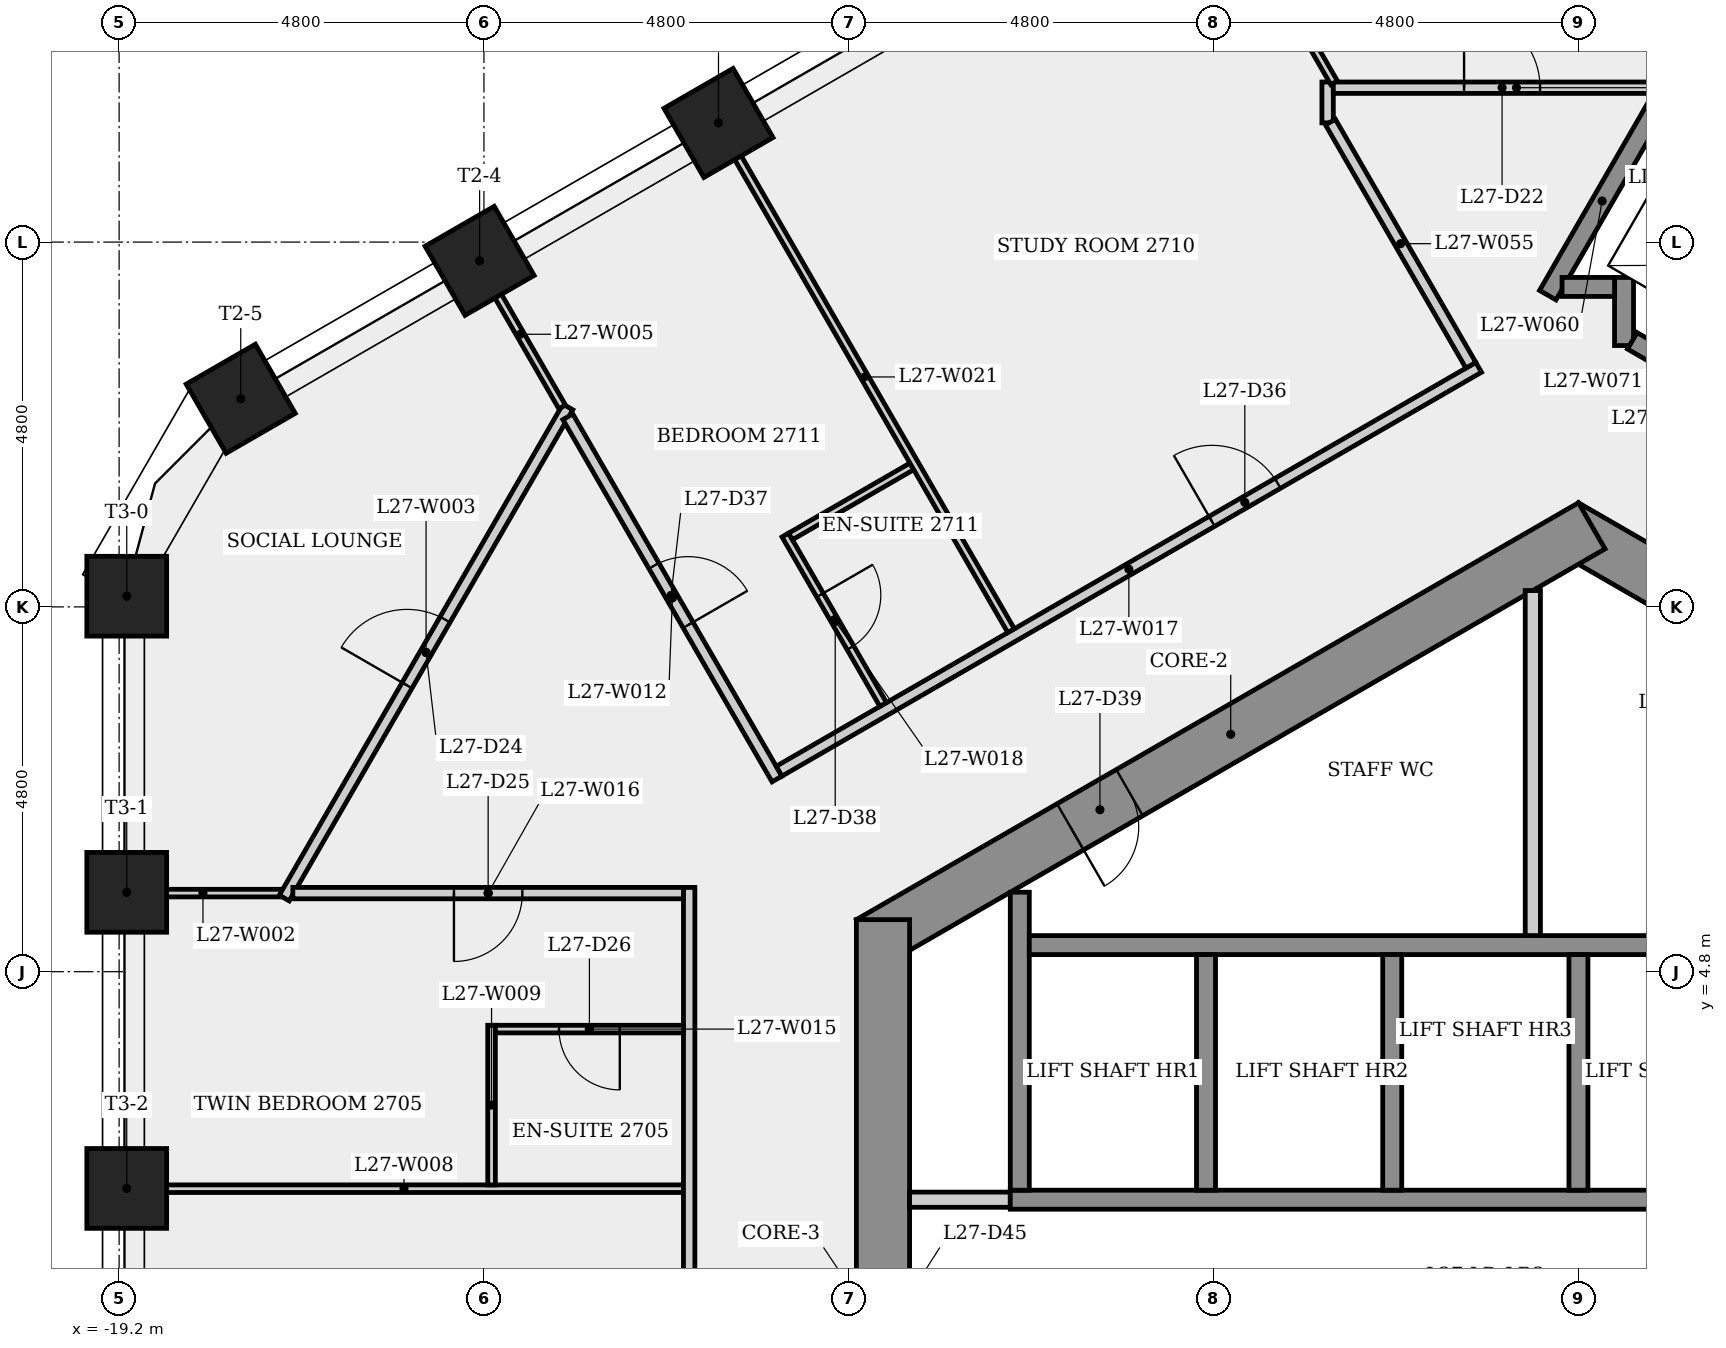
"""IFC4 building model, lengths in metres.
Left out: names, types, materials, properties, quantities, classifications, styles, units other than length and angle.
Written with IfcOpenShell. Run it as: python <this file> out.ifc"""

import sys

from ifc_helpers import new_model, si_unit, direction, frame, frame_2d, origin, origin_2d, place, context, subcontext, project, spatial, rectangle, extrude, element, fill, save


model = new_model("IFC4")
c1 = context("Model", 3, precision=1e-05, world=origin(), true_north=direction((0.0, 1.0)))
c2 = subcontext(c1, "Body", "Model", "MODEL_VIEW")
j1 = project(units=[si_unit("LENGTHUNIT", "METRE"), si_unit("PLANEANGLEUNIT", "RADIAN")], contexts=[c1])
p1 = place(None, origin())
s1 = spatial("IfcSite", under=j1, at=p1, CompositionType="ELEMENT")
p2 = place(p1, origin())
s2 = spatial("IfcBuilding", under=s1, at=p2, CompositionType="ELEMENT")
p3 = place(p2, frame((0.0, 0.0, 103.5)))
s3 = spatial("IfcBuildingStorey", under=s2, at=p3, CompositionType="ELEMENT", Elevation=103.5)
p4 = place(p3, frame((9.325, 5.182, 0.0), z_axis=(0.0, 0.0, 1.0), x_axis=(-0.866023993627, 0.500002442456, 0.0)))
e1 = element("IfcWall", 1, at=p4, inside=s3, PredefinedType="SHEAR", context=c2, shape_type="SweptSolid", body=[
    extrude(rectangle(XDim=10.97, YDim=0.7, at=frame_2d((5.485, 0.0))), origin(), (0.0, 0.0, 1.0), 3.4),
])
p5 = place(p4, frame((5.451, 0.0, 0.0)))
e2 = element("IfcOpeningElement", 2, at=p5, cuts=e1, PredefinedType="OPENING", context=c2, shape_type="SweptSolid", body=[
    extrude(rectangle(XDim=0.9, YDim=2.1, at=frame_2d((0.45, 1.05))), frame((0.0, 0.36, 0.0), z_axis=(0.0, -1.0, 0.0), x_axis=(1.0, 0.0, 0.0)), (0.0, 0.0, 1.0), 0.72),
])
p6 = place(p3, frame((0.175, 10.667, 0.0), z_axis=(0.0, 0.0, 1.0), x_axis=(-0.866023993627, -0.500002442456, 0.0)))
e3 = element("IfcWall", 3, at=p6, inside=s3, PredefinedType="SHEAR", context=c2, shape_type="SweptSolid", body=[
    extrude(rectangle(XDim=10.97, YDim=0.7, at=frame_2d((5.485, 0.0))), origin(), (0.0, 0.0, 1.0), 3.4),
])
p7 = place(p6, frame((7.021, 0.0, 0.0)))
e4 = element("IfcOpeningElement", 4, at=p7, cuts=e3, PredefinedType="OPENING", context=c2, shape_type="SweptSolid", body=[
    extrude(rectangle(XDim=0.9, YDim=2.1, at=frame_2d((0.45, 1.05))), frame((0.0, 0.36, 0.0), z_axis=(0.0, -1.0, 0.0), x_axis=(1.0, 0.0, 0.0)), (0.0, 0.0, 1.0), 0.72),
])
p8 = place(p3, frame((-9.15, 5.485, 0.0), z_axis=(0.0, 0.0, 1.0), x_axis=(0.0, -1.0, 0.0)))
e5 = element("IfcWall", 5, at=p8, inside=s3, PredefinedType="SHEAR", context=c2, shape_type="SweptSolid", body=[
    extrude(rectangle(XDim=10.97, YDim=0.7, at=frame_2d((5.485, 0.0))), origin(), (0.0, 0.0, 1.0), 3.4),
])
p9 = place(p8, frame((4.685, 0.0, 0.0)))
e6 = element("IfcOpeningElement", 6, at=p9, cuts=e5, PredefinedType="OPENING", context=c2, shape_type="SweptSolid", body=[
    extrude(rectangle(XDim=1.6, YDim=2.1, at=frame_2d((0.8, 1.05))), frame((0.0, 0.36, 0.0), z_axis=(0.0, -1.0, 0.0), x_axis=(1.0, 0.0, 0.0)), (0.0, 0.0, 1.0), 0.72),
])
for number, where, z_axis, x_axis in (
    (7, (-11.314, 15.968, 0.0), (0.0, 0.0, 1.0), (-0.5, 0.866, 0.0)),
    (8, (-14.457, 14.153, 0.0), (0.0, 0.0, 1.0), (-0.5, 0.866, 0.0)),
    (9, (-17.6, 12.339, 0.0), (0.0, 0.0, 1.0), (-0.5, 0.866, 0.0)),
    (10, (-19.1, 9.741, 0.0), (0.0, 0.0, 1.0), (-1.0, 0.0, 0.0)),
    (11, (-19.1, 5.844, 0.0), (0.0, 0.0, 1.0), (-1.0, 0.0, 0.0)),
    (12, (-19.1, 1.948, 0.0), (0.0, 0.0, 1.0), (-1.0, 0.0, 0.0)),
):
    element("IfcColumn", number, at=place(p3, frame(where, z_axis=z_axis, x_axis=x_axis)), inside=s3, PredefinedType="COLUMN", context=c2, shape_type="SweptSolid", body=[
        extrude(rectangle(XDim=1.05, YDim=1.05, at=origin_2d()), origin(), (0.0, 0.0, 1.0), 3.4),
    ])
p10 = place(p3, frame((-17.064, 5.834, 0.0), z_axis=(0.0, 0.0, 1.0), x_axis=(-1.0, 0.0, 0.0)))
e13 = element("IfcWall", 13, at=p10, inside=s3, PredefinedType="PARTITIONING", context=c2, shape_type="SweptSolid", body=[
    extrude(rectangle(XDim=2.065, YDim=0.1, at=frame_2d((1.032, 0.0))), origin(), (0.0, 0.0, 1.0), 3.05),
])
p11 = place(p3, frame((-17.027, 5.769, 0.0), z_axis=(0.0, 0.0, 1.0), x_axis=(0.500017007625, 0.866015584205, 0.0)))
e14 = element("IfcWall", 14, at=p11, inside=s3, PredefinedType="PARTITIONING", context=c2, shape_type="SweptSolid", body=[
    extrude(rectangle(XDim=7.462, YDim=0.15, at=frame_2d((3.731, 0.0))), origin(), (0.0, 0.0, 1.0), 3.05),
])
p12 = place(p11, frame((3.231, 0.0, 0.0)))
e15 = element("IfcOpeningElement", 15, at=p12, cuts=e14, PredefinedType="OPENING", context=c2, shape_type="SweptSolid", body=[
    extrude(rectangle(XDim=1.0, YDim=2.1, at=frame_2d((0.5, 1.05))), frame((0.0, 0.085, 0.0), z_axis=(0.0, -1.0, 0.0), x_axis=(1.0, 0.0, 0.0)), (0.0, 0.0, 1.0), 0.17),
])
p13 = place(p3, frame((-14.475, 14.143, 0.0), z_axis=(0.0, 0.0, 1.0), x_axis=(0.49998092645, -0.866036415623, 0.0)))
e16 = element("IfcWall", 16, at=p13, inside=s3, PredefinedType="PARTITIONING", context=c2, shape_type="SweptSolid", body=[
    extrude(rectangle(XDim=2.208, YDim=0.1, at=frame_2d((1.104, 0.0))), origin(), (0.0, 0.0, 1.0), 3.05),
])
p14 = place(p3, frame((-19.129, 1.945, 0.0), z_axis=(0.0, 0.0, 1.0), x_axis=(1.0, 0.0, 0.0)))
e17 = element("IfcWall", 17, at=p14, inside=s3, PredefinedType="PARTITIONING", context=c2, shape_type="SweptSolid", body=[
    extrude(rectangle(XDim=7.354, YDim=0.1, at=frame_2d((3.677, 0.0))), origin(), (0.0, 0.0, 1.0), 3.05),
])
p15 = place(p3, frame((-14.3, 4.095, 0.0), z_axis=(0.0, 0.0, 1.0), x_axis=(0.0, -1.0, 0.0)))
e18 = element("IfcWall", 18, at=p15, inside=s3, PredefinedType="PARTITIONING", context=c2, shape_type="SweptSolid", body=[
    extrude(rectangle(XDim=2.1, YDim=0.1, at=frame_2d((1.05, 0.0))), origin(), (0.0, 0.0, 1.0), 3.05),
])
p16 = place(p3, frame((-13.296, 12.101, 0.0), z_axis=(0.0, 0.0, 1.0), x_axis=(0.499984873778, -0.866034136737, 0.0)))
e19 = element("IfcWall", 19, at=p16, inside=s3, PredefinedType="PARTITIONING", context=c2, shape_type="SweptSolid", body=[
    extrude(rectangle(XDim=5.503, YDim=0.15, at=frame_2d((2.751, 0.0))), origin(), (0.0, 0.0, 1.0), 3.05),
])
p17 = place(p16, frame((2.264, 0.0, 0.0)))
e20 = element("IfcOpeningElement", 20, at=p17, cuts=e19, PredefinedType="OPENING", context=c2, shape_type="SweptSolid", body=[
    extrude(rectangle(XDim=0.9, YDim=2.1, at=frame_2d((0.45, 1.05))), frame((0.0, 0.085, 0.0), z_axis=(0.0, -1.0, 0.0), x_axis=(1.0, 0.0, 0.0)), (0.0, 0.0, 1.0), 0.17),
])
p18 = place(p3, frame((-11.7, 5.909, 0.0), z_axis=(0.0, 0.0, 1.0), x_axis=(0.0, -1.0, 0.0)))
e21 = element("IfcWall", 21, at=p18, inside=s3, PredefinedType="PARTITIONING", context=c2, shape_type="SweptSolid", body=[
    extrude(rectangle(XDim=11.668, YDim=0.15, at=frame_2d((5.834, 0.0))), origin(), (0.0, 0.0, 1.0), 3.05),
])
p19 = place(p18, frame((7.331, 0.0, 0.0)))
e22 = element("IfcOpeningElement", 22, at=p19, cuts=e21, PredefinedType="OPENING", context=c2, shape_type="SweptSolid", body=[
    extrude(rectangle(XDim=1.0, YDim=2.1, at=frame_2d((0.5, 1.05))), frame((0.0, 0.085, 0.0), z_axis=(0.0, -1.0, 0.0), x_axis=(1.0, 0.0, 0.0)), (0.0, 0.0, 1.0), 0.17),
])
p20 = place(p3, frame((-11.775, 4.045, 0.0), z_axis=(0.0, 0.0, 1.0), x_axis=(-1.0, 0.0, 0.0)))
e23 = element("IfcWall", 23, at=p20, inside=s3, PredefinedType="PARTITIONING", context=c2, shape_type="SweptSolid", body=[
    extrude(rectangle(XDim=2.475, YDim=0.1, at=frame_2d((1.238, 0.0))), origin(), (0.0, 0.0, 1.0), 3.05),
])
p21 = place(p20, frame((0.837, 0.0, 0.0)))
e24 = element("IfcOpeningElement", 24, at=p21, cuts=e23, PredefinedType="OPENING", context=c2, shape_type="SweptSolid", body=[
    extrude(rectangle(XDim=0.8, YDim=2.1, at=frame_2d((0.4, 1.05))), frame((0.0, 0.06, 0.0), z_axis=(0.0, -1.0, 0.0), x_axis=(1.0, 0.0, 0.0)), (0.0, 0.0, 1.0), 0.12),
])
p22 = place(p3, frame((-11.775, 5.834, 0.0), z_axis=(0.0, 0.0, 1.0), x_axis=(-1.0, 0.0, 0.0)))
e25 = element("IfcWall", 25, at=p22, inside=s3, PredefinedType="PARTITIONING", context=c2, shape_type="SweptSolid", body=[
    extrude(rectangle(XDim=5.139, YDim=0.15, at=frame_2d((2.57, 0.0))), origin(), (0.0, 0.0, 1.0), 3.05),
])
p23 = place(p22, frame((2.12, 0.0, 0.0)))
e26 = element("IfcOpeningElement", 26, at=p23, cuts=e25, PredefinedType="OPENING", context=c2, shape_type="SweptSolid", body=[
    extrude(rectangle(XDim=0.9, YDim=2.1, at=frame_2d((0.45, 1.05))), frame((0.0, 0.085, 0.0), z_axis=(0.0, -1.0, 0.0), x_axis=(1.0, 0.0, 0.0)), (0.0, 0.0, 1.0), 0.17),
])
p24 = place(p3, frame((-10.517, 7.438, 0.0), z_axis=(0.0, 0.0, 1.0), x_axis=(0.866032192358, 0.499988241661, 0.0)))
e27 = element("IfcWall", 27, at=p24, inside=s3, PredefinedType="PARTITIONING", context=c2, shape_type="SweptSolid", body=[
    extrude(rectangle(XDim=10.628, YDim=0.15, at=frame_2d((5.314, 0.0))), origin(), (0.0, 0.0, 1.0), 3.05),
])
p25 = place(p24, frame((6.575, 0.0, 0.0)))
e28 = element("IfcOpeningElement", 28, at=p25, cuts=e27, PredefinedType="OPENING", context=c2, shape_type="SweptSolid", body=[
    extrude(rectangle(XDim=1.0, YDim=2.1, at=frame_2d((0.5, 1.05))), frame((0.0, 0.085, 0.0), z_axis=(0.0, -1.0, 0.0), x_axis=(1.0, 0.0, 0.0)), (0.0, 0.0, 1.0), 0.17),
])
p26 = place(p3, frame((-10.435, 10.545, 0.0), z_axis=(0.0, 0.0, 1.0), x_axis=(0.500034319456, -0.866005588531, 0.0)))
e29 = element("IfcWall", 29, at=p26, inside=s3, PredefinedType="PARTITIONING", context=c2, shape_type="SweptSolid", body=[
    extrude(rectangle(XDim=2.575, YDim=0.1, at=frame_2d((1.288, 0.0))), origin(), (0.0, 0.0, 1.0), 3.05),
])
p27 = place(p26, frame((0.913, 0.0, 0.0)))
e30 = element("IfcOpeningElement", 30, at=p27, cuts=e29, PredefinedType="OPENING", context=c2, shape_type="SweptSolid", body=[
    extrude(rectangle(XDim=0.8, YDim=2.1, at=frame_2d((0.4, 1.05))), frame((0.0, 0.06, 0.0), z_axis=(0.0, -1.0, 0.0), x_axis=(1.0, 0.0, 0.0)), (0.0, 0.0, 1.0), 0.12),
])
p28 = place(p3, frame((-8.8, 1.8, 0.0), z_axis=(0.0, 0.0, 1.0), x_axis=(1.0, 0.0, 0.0)))
e31 = element("IfcWall", 31, at=p28, inside=s3, PredefinedType="PARTITIONING", context=c2, shape_type="SweptSolid", body=[
    extrude(rectangle(XDim=1.325, YDim=0.2, at=frame_2d((0.663, 0.0))), origin(), (0.0, 0.0, 1.0), 3.05),
])
p29 = place(p3, frame((-8.771, 11.448, 0.0), z_axis=(0.0, 0.0, 1.0), x_axis=(-0.866033360935, -0.499986217557, 0.0)))
e32 = element("IfcWall", 32, at=p29, inside=s3, PredefinedType="PARTITIONING", context=c2, shape_type="SweptSolid", body=[
    extrude(rectangle(XDim=1.843, YDim=0.1, at=frame_2d((0.921, 0.0))), origin(), (0.0, 0.0, 1.0), 3.05),
])
p30 = place(p3, frame((-11.32, 15.964, 0.0), z_axis=(0.0, 0.0, 1.0), x_axis=(0.499997453958, -0.866026873738, 0.0)))
e33 = element("IfcWall", 33, at=p30, inside=s3, PredefinedType="PARTITIONING", context=c2, shape_type="SweptSolid", body=[
    extrude(rectangle(XDim=7.71, YDim=0.1, at=frame_2d((3.855, 0.0))), origin(), (0.0, 0.0, 1.0), 3.05),
])
p31 = place(p3, frame((-7.475, 1.8, 0.0), z_axis=(0.0, 0.0, 1.0), x_axis=(1.0, 0.0, 0.0)))
e34 = element("IfcWall", 34, at=p31, inside=s3, PredefinedType="SHEAR", context=c2, shape_type="SweptSolid", body=[
    extrude(rectangle(XDim=14.95, YDim=0.25, at=frame_2d((7.475, 0.0))), origin(), (0.0, 0.0, 1.0), 3.05),
])
p32 = place(p3, frame((-7.35, 1.925, 0.0), z_axis=(0.0, 0.0, 1.0), x_axis=(0.0, 1.0, 0.0)))
e35 = element("IfcWall", 35, at=p32, inside=s3, PredefinedType="SHEAR", context=c2, shape_type="SweptSolid", body=[
    extrude(rectangle(XDim=3.921, YDim=0.25, at=frame_2d((1.96, 0.0))), origin(), (0.0, 0.0, 1.0), 3.05),
])
p33 = place(p3, frame((-7.225, 5.15, 0.0), z_axis=(0.0, 0.0, 1.0), x_axis=(1.0, 0.0, 0.0)))
e36 = element("IfcWall", 36, at=p33, inside=s3, PredefinedType="SHEAR", context=c2, shape_type="SweptSolid", body=[
    extrude(rectangle(XDim=14.7, YDim=0.25, at=frame_2d((7.35, 0.0))), origin(), (0.0, 0.0, 1.0), 3.05),
])
p34 = place(p3, frame((-4.9, 5.025, 0.0), z_axis=(0.0, 0.0, 1.0), x_axis=(0.0, -1.0, 0.0)))
e37 = element("IfcWall", 37, at=p34, inside=s3, PredefinedType="SHEAR", context=c2, shape_type="SweptSolid", body=[
    extrude(rectangle(XDim=3.1, YDim=0.25, at=frame_2d((1.55, 0.0))), origin(), (0.0, 0.0, 1.0), 3.4),
])
p35 = place(p3, frame((-3.3, 15.969, 0.0), z_axis=(0.0, 0.0, 1.0), x_axis=(0.0, 1.0, 0.0)))
e38 = element("IfcWall", 38, at=p35, inside=s3, PredefinedType="PARTITIONING", context=c2, shape_type="SweptSolid", body=[
    extrude(rectangle(XDim=0.537, YDim=0.15, at=frame_2d((0.269, 0.0))), origin(), (0.0, 0.0, 1.0), 3.05),
])
p36 = place(p3, frame((-3.225, 16.431, 0.0), z_axis=(0.0, 0.0, 1.0), x_axis=(1.0, 0.0, 0.0)))
e39 = element("IfcWall", 39, at=p36, inside=s3, PredefinedType="PARTITIONING", context=c2, shape_type="SweptSolid", body=[
    extrude(rectangle(XDim=4.819, YDim=0.15, at=frame_2d((2.41, 0.0))), origin(), (0.0, 0.0, 1.0), 3.05),
])
p37 = place(p36, frame((1.72, 0.0, 0.0)))
e40 = element("IfcOpeningElement", 40, at=p37, cuts=e39, PredefinedType="OPENING", context=c2, shape_type="SweptSolid", body=[
    extrude(rectangle(XDim=1.0, YDim=2.1, at=frame_2d((0.5, 1.05))), frame((0.0, 0.085, 0.0), z_axis=(0.0, -1.0, 0.0), x_axis=(1.0, 0.0, 0.0)), (0.0, 0.0, 1.0), 0.17),
])
p38 = place(p3, frame((-3.215, 16.496, 0.0), z_axis=(0.0, 0.0, 1.0), x_axis=(-0.499998991654, 0.866025985952, 0.0)))
e41 = element("IfcWall", 41, at=p38, inside=s3, PredefinedType="PARTITIONING", context=c2, shape_type="SweptSolid", body=[
    extrude(rectangle(XDim=3.592, YDim=0.1, at=frame_2d((1.796, 0.0))), origin(), (0.0, 0.0, 1.0), 3.05),
])
p39 = place(p3, frame((-2.45, 5.025, 0.0), z_axis=(0.0, 0.0, 1.0), x_axis=(0.0, -1.0, 0.0)))
e42 = element("IfcWall", 42, at=p39, inside=s3, PredefinedType="SHEAR", context=c2, shape_type="SweptSolid", body=[
    extrude(rectangle(XDim=3.1, YDim=0.25, at=frame_2d((1.55, 0.0))), origin(), (0.0, 0.0, 1.0), 3.4),
])
p40 = place(p3, frame((-1.415, 12.78, 0.0), z_axis=(0.0, 0.0, 1.0), x_axis=(-0.499991312689, 0.866030419348, 0.0)))
e43 = element("IfcWall", 43, at=p40, inside=s3, PredefinedType="PARTITIONING", context=c2, shape_type="SweptSolid", body=[
    extrude(rectangle(XDim=3.694, YDim=0.15, at=frame_2d((1.847, 0.0))), origin(), (0.0, 0.0, 1.0), 3.05),
])
p41 = place(p3, frame((-0.6, 9.815, 0.0), z_axis=(0.0, 0.0, 1.0), x_axis=(0.0, -1.0, 0.0)))
e44 = element("IfcWall", 44, at=p41, inside=s3, PredefinedType="PARTITIONING", context=c2, shape_type="SweptSolid", body=[
    extrude(rectangle(XDim=4.54, YDim=0.2, at=frame_2d((2.27, 0.0))), origin(), (0.0, 0.0, 1.0), 3.05),
])
p42 = place(p3, frame((-0.403, 13.702, 0.0), z_axis=(0.0, 0.0, 1.0), x_axis=(0.499976111731, 0.866039195244, 0.0)))
e45 = element("IfcWall", 45, at=p42, inside=s3, PredefinedType="SHEAR", context=c2, shape_type="SweptSolid", body=[
    extrude(rectangle(XDim=2.861, YDim=0.25, at=frame_2d((1.43, 0.0))), origin(), (0.0, 0.0, 1.0), 3.05),
])
p43 = place(p3, frame((0.0, 5.025, 0.0), z_axis=(0.0, 0.0, 1.0), x_axis=(0.0, -1.0, 0.0)))
e46 = element("IfcWall", 46, at=p43, inside=s3, PredefinedType="SHEAR", context=c2, shape_type="SweptSolid", body=[
    extrude(rectangle(XDim=3.1, YDim=0.25, at=frame_2d((1.55, 0.0))), origin(), (0.0, 0.0, 1.0), 3.4),
])
p44 = place(p3, frame((0.6, 13.039, 0.0), z_axis=(0.0, 0.0, 1.0), x_axis=(0.0, 1.0, 0.0)))
e47 = element("IfcWall", 47, at=p44, inside=s3, PredefinedType="SHEAR", context=c2, shape_type="SweptSolid", body=[
    extrude(rectangle(XDim=0.896, YDim=0.25, at=frame_2d((0.448, 0.0))), origin(), (0.0, 0.0, 1.0), 3.05),
])
p45 = place(p3, frame((0.475, 13.81, 0.0), z_axis=(0.0, 0.0, 1.0), x_axis=(-1.0, 0.0, 0.0)))
e48 = element("IfcWall", 48, at=p45, inside=s3, PredefinedType="SHEAR", context=c2, shape_type="SweptSolid", body=[
    extrude(rectangle(XDim=0.691, YDim=0.25, at=frame_2d((0.345, 0.0))), origin(), (0.0, 0.0, 1.0), 3.4),
])
p46 = place(p3, frame((2.581, 12.02, 0.0), z_axis=(0.0, 0.0, 1.0), x_axis=(-0.86603892542, 0.499976579108, 0.0)))
e49 = element("IfcWall", 49, at=p46, inside=s3, PredefinedType="SHEAR", context=c2, shape_type="SweptSolid", body=[
    extrude(rectangle(XDim=2.162, YDim=0.25, at=frame_2d((1.081, 0.0))), origin(), (0.0, 0.0, 1.0), 3.05),
])
p47 = place(p37, origin())
e50 = element("IfcDoor", 50, at=p47, inside=s3, OperationType="SINGLE_SWING_LEFT", PredefinedType="DOOR", context=c2, shape_type="SweptSolid", body=[
    extrude(rectangle(XDim=1.0, YDim=2.1, at=frame_2d((0.5, 1.05))), frame((0.0, 0.025, 0.0), z_axis=(0.0, -1.0, 0.0), x_axis=(1.0, 0.0, 0.0)), (0.0, 0.0, 1.0), 0.05),
])
fill(e40, e50)
p48 = place(p12, origin())
e51 = element("IfcDoor", 51, at=p48, inside=s3, OperationType="SINGLE_SWING_LEFT", PredefinedType="DOOR", context=c2, shape_type="SweptSolid", body=[
    extrude(rectangle(XDim=1.0, YDim=2.1, at=frame_2d((0.5, 1.05))), frame((0.0, 0.025, 0.0), z_axis=(0.0, -1.0, 0.0), x_axis=(1.0, 0.0, 0.0)), (0.0, 0.0, 1.0), 0.05),
])
fill(e15, e51)
p49 = place(p23, origin())
e52 = element("IfcDoor", 52, at=p49, inside=s3, OperationType="SINGLE_SWING_RIGHT", PredefinedType="DOOR", context=c2, shape_type="SweptSolid", body=[
    extrude(rectangle(XDim=0.9, YDim=2.1, at=frame_2d((0.45, 1.05))), frame((0.0, 0.025, 0.0), z_axis=(0.0, -1.0, 0.0), x_axis=(1.0, 0.0, 0.0)), (0.0, 0.0, 1.0), 0.05),
])
fill(e26, e52)
p50 = place(p21, origin())
e53 = element("IfcDoor", 53, at=p50, inside=s3, OperationType="SINGLE_SWING_LEFT", PredefinedType="DOOR", context=c2, shape_type="SweptSolid", body=[
    extrude(rectangle(XDim=0.8, YDim=2.1, at=frame_2d((0.4, 1.05))), frame((0.0, 0.025, 0.0), z_axis=(0.0, -1.0, 0.0), x_axis=(1.0, 0.0, 0.0)), (0.0, 0.0, 1.0), 0.05),
])
fill(e24, e53)
p51 = place(p25, origin())
e54 = element("IfcDoor", 54, at=p51, inside=s3, OperationType="SINGLE_SWING_LEFT", PredefinedType="DOOR", context=c2, shape_type="SweptSolid", body=[
    extrude(rectangle(XDim=1.0, YDim=2.1, at=frame_2d((0.5, 1.05))), frame((0.0, 0.025, 0.0), z_axis=(0.0, -1.0, 0.0), x_axis=(1.0, 0.0, 0.0)), (0.0, 0.0, 1.0), 0.05),
])
fill(e28, e54)
p52 = place(p17, origin())
e55 = element("IfcDoor", 55, at=p52, inside=s3, OperationType="SINGLE_SWING_RIGHT", PredefinedType="DOOR", context=c2, shape_type="SweptSolid", body=[
    extrude(rectangle(XDim=0.9, YDim=2.1, at=frame_2d((0.45, 1.05))), frame((0.0, 0.025, 0.0), z_axis=(0.0, -1.0, 0.0), x_axis=(1.0, 0.0, 0.0)), (0.0, 0.0, 1.0), 0.05),
])
fill(e20, e55)
p53 = place(p27, origin())
e56 = element("IfcDoor", 56, at=p53, inside=s3, OperationType="SINGLE_SWING_LEFT", PredefinedType="DOOR", context=c2, shape_type="SweptSolid", body=[
    extrude(rectangle(XDim=0.8, YDim=2.1, at=frame_2d((0.4, 1.05))), frame((0.0, 0.025, 0.0), z_axis=(0.0, -1.0, 0.0), x_axis=(1.0, 0.0, 0.0)), (0.0, 0.0, 1.0), 0.05),
])
fill(e30, e56)
p54 = place(p7, origin())
e57 = element("IfcDoor", 57, at=p54, inside=s3, OperationType="SINGLE_SWING_RIGHT", PredefinedType="DOOR", context=c2, shape_type="SweptSolid", body=[
    extrude(rectangle(XDim=0.9, YDim=2.1, at=frame_2d((0.45, 1.05))), frame((0.0, 0.025, 0.0), z_axis=(0.0, -1.0, 0.0), x_axis=(1.0, 0.0, 0.0)), (0.0, 0.0, 1.0), 0.05),
])
fill(e4, e57)
save(model, sys.argv[1])
